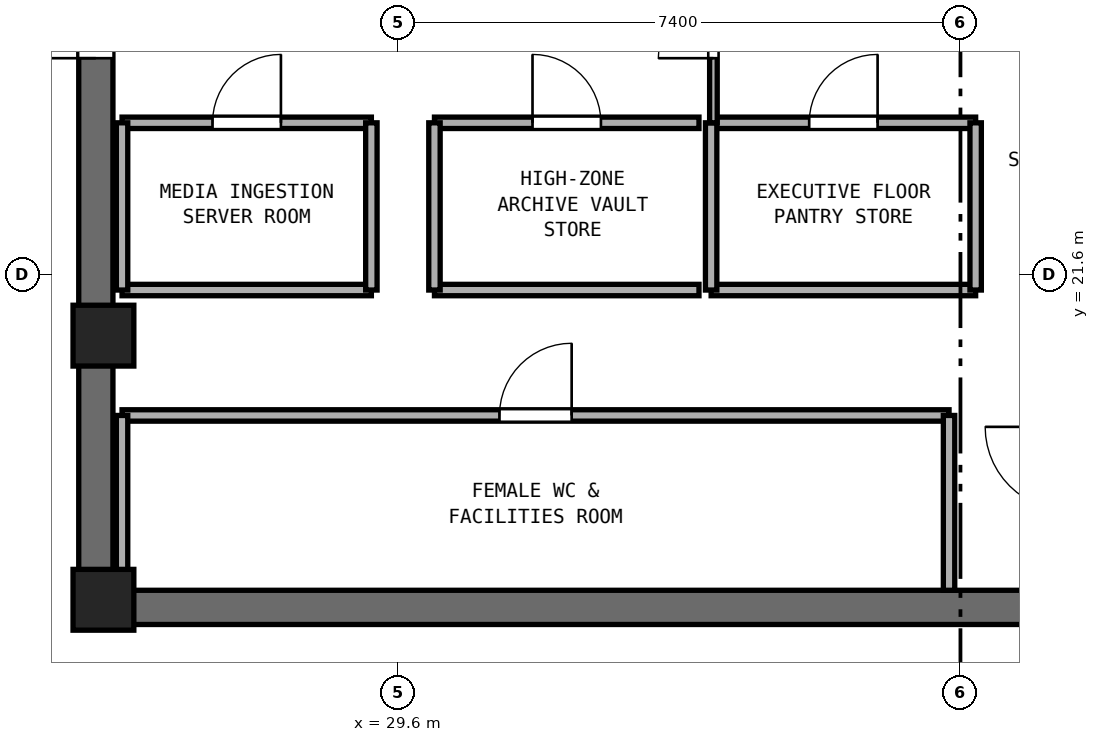
"""IFC4 building model, lengths in metres.
Left out: names, types, materials, properties, quantities, classifications, styles, units other than length and angle.
Written with IfcOpenShell. Run it as: python <this file> out.ifc"""

import sys

from ifc_helpers import new_model, si_unit, direction, frame, frame_2d, origin, origin_2d, place, context, subcontext, project, spatial, rectangle, extrude, element, fill, save


model = new_model("IFC4")
c1 = context("Model", 3, precision=1e-05, world=origin(), true_north=direction((0.0, 1.0)))
c2 = subcontext(c1, "Body", "Model", "MODEL_VIEW")
j1 = project(units=[si_unit("LENGTHUNIT", "METRE"), si_unit("PLANEANGLEUNIT", "RADIAN")], contexts=[c1])
p1 = place(None, origin())
s1 = spatial("IfcSite", under=j1, at=p1, CompositionType="ELEMENT")
p2 = place(p1, origin())
s2 = spatial("IfcBuilding", under=s1, at=p2, CompositionType="ELEMENT")
p3 = place(p2, frame((0.0, 0.0, 232.6)))
s3 = spatial("IfcBuildingStorey", under=s2, at=p3, CompositionType="ELEMENT", Elevation=232.6)
p4 = place(p3, frame((25.4, 17.225, 0.0), z_axis=(0.0, 0.0, 1.0), x_axis=(1.0, 0.0, 0.0)))
e1 = element("IfcWall", 1, at=p4, inside=s3, PredefinedType="SHEAR", context=c2, shape_type="SweptSolid", body=[
    extrude(rectangle(XDim=23.2, YDim=0.45, at=frame_2d((11.6, 0.0))), origin(), (0.0, 0.0, 1.0), 3.51),
])
p5 = place(p3, frame((25.625, 17.45, 0.0), z_axis=(0.0, 0.0, 1.0), x_axis=(0.0, 1.0, 0.0)))
e2 = element("IfcWall", 2, at=p5, inside=s3, PredefinedType="SHEAR", context=c2, shape_type="SweptSolid", body=[
    extrude(rectangle(XDim=15.5, YDim=0.45, at=frame_2d((7.75, 0.0))), origin(), (0.0, 0.0, 1.0), 3.51),
])
p6 = place(p5, frame((7.0, 0.0, 0.0)))
e3 = element("IfcOpeningElement", 3, at=p6, cuts=e2, PredefinedType="OPENING", context=c2, shape_type="SweptSolid", body=[
    extrude(rectangle(XDim=1.5, YDim=2.15, at=frame_2d((0.75, 1.075))), frame((0.0, 0.235, 0.0), z_axis=(0.0, -1.0, 0.0), x_axis=(1.0, 0.0, 0.0)), (0.0, 0.0, 1.0), 0.47),
])
for number, where, z_axis, x_axis in (
    (4, (25.725, 17.325, 0.0), (0.0, 0.0, 1.0), (1.0, 0.0, 0.0)),
    (5, (25.725, 20.8, 0.0), (0.0, 0.0, 1.0), (1.0, 0.0, 0.0)),
):
    element("IfcColumn", number, at=place(p3, frame(where, z_axis=z_axis, x_axis=x_axis)), inside=s3, PredefinedType="PILASTER", context=c2, shape_type="SweptSolid", body=[
        extrude(rectangle(XDim=0.8, YDim=0.8, at=origin_2d()), origin(), (0.0, 0.0, 1.0), 3.8),
    ])
p7 = place(p3, frame((25.97, 19.75, 0.0), z_axis=(0.0, 0.0, 1.0), x_axis=(1.0, 0.0, 0.0)))
e6 = element("IfcWall", 6, at=p7, inside=s3, PredefinedType="PARTITIONING", context=c2, shape_type="SweptSolid", body=[
    extrude(rectangle(XDim=10.88, YDim=0.15, at=frame_2d((5.44, 0.0))), origin(), (0.0, 0.0, 1.0), 3.51),
])
p8 = place(p7, frame((4.965, 0.0, 0.0)))
e7 = element("IfcOpeningElement", 7, at=p8, cuts=e6, PredefinedType="OPENING", context=c2, shape_type="SweptSolid", body=[
    extrude(rectangle(XDim=0.95, YDim=2.1, at=frame_2d((0.475, 1.05))), frame((0.0, 0.085, 0.0), z_axis=(0.0, -1.0, 0.0), x_axis=(1.0, 0.0, 0.0)), (0.0, 0.0, 1.0), 0.17),
])
p9 = place(p3, frame((25.97, 17.45, 0.0), z_axis=(0.0, 0.0, 1.0), x_axis=(0.0, 1.0, 0.0)))
e8 = element("IfcWall", 8, at=p9, inside=s3, PredefinedType="PARTITIONING", context=c2, shape_type="SweptSolid", body=[
    extrude(rectangle(XDim=2.3, YDim=0.15, at=frame_2d((1.15, 0.0))), origin(), (0.0, 0.0, 1.0), 2.61),
])
p10 = place(p3, frame((36.85, 17.45, 0.0), z_axis=(0.0, 0.0, 1.0), x_axis=(0.0, 1.0, 0.0)))
e9 = element("IfcWall", 9, at=p10, inside=s3, PredefinedType="PARTITIONING", context=c2, shape_type="SweptSolid", body=[
    extrude(rectangle(XDim=2.3, YDim=0.15, at=frame_2d((1.15, 0.0))), origin(), (0.0, 0.0, 1.0), 3.51),
])
p11 = place(p3, frame((25.97, 21.4, 0.0), z_axis=(0.0, 0.0, 1.0), x_axis=(1.0, 0.0, 0.0)))
e10 = element("IfcWall", 10, at=p11, inside=s3, PredefinedType="PARTITIONING", context=c2, shape_type="SweptSolid", body=[
    extrude(rectangle(XDim=3.28, YDim=0.15, at=frame_2d((1.64, 0.0))), origin(), (0.0, 0.0, 1.0), 3.51),
])
p12 = place(p3, frame((25.97, 23.6, 0.0), z_axis=(0.0, 0.0, 1.0), x_axis=(1.0, 0.0, 0.0)))
e11 = element("IfcWall", 11, at=p12, inside=s3, PredefinedType="PARTITIONING", context=c2, shape_type="SweptSolid", body=[
    extrude(rectangle(XDim=3.28, YDim=0.15, at=frame_2d((1.64, 0.0))), origin(), (0.0, 0.0, 1.0), 3.51),
])
p13 = place(p12, frame((1.19, 0.0, 0.0)))
e12 = element("IfcOpeningElement", 12, at=p13, cuts=e11, PredefinedType="OPENING", context=c2, shape_type="SweptSolid", body=[
    extrude(rectangle(XDim=0.9, YDim=2.1, at=frame_2d((0.45, 1.05))), frame((0.0, 0.085, 0.0), z_axis=(0.0, -1.0, 0.0), x_axis=(1.0, 0.0, 0.0)), (0.0, 0.0, 1.0), 0.17),
])
p14 = place(p3, frame((25.97, 21.4, 0.0), z_axis=(0.0, 0.0, 1.0), x_axis=(0.0, 1.0, 0.0)))
e13 = element("IfcWall", 13, at=p14, inside=s3, PredefinedType="PARTITIONING", context=c2, shape_type="SweptSolid", body=[
    extrude(rectangle(XDim=2.2, YDim=0.15, at=frame_2d((1.1, 0.0))), origin(), (0.0, 0.0, 1.0), 2.61),
])
p15 = place(p3, frame((29.25, 21.4, 0.0), z_axis=(0.0, 0.0, 1.0), x_axis=(0.0, 1.0, 0.0)))
e14 = element("IfcWall", 14, at=p15, inside=s3, PredefinedType="PARTITIONING", context=c2, shape_type="SweptSolid", body=[
    extrude(rectangle(XDim=2.2, YDim=0.15, at=frame_2d((1.1, 0.0))), origin(), (0.0, 0.0, 1.0), 3.51),
])
p16 = place(p3, frame((30.08, 21.4, 0.0), z_axis=(0.0, 0.0, 1.0), x_axis=(1.0, 0.0, 0.0)))
e15 = element("IfcWall", 15, at=p16, inside=s3, PredefinedType="PARTITIONING", context=c2, shape_type="SweptSolid", body=[
    extrude(rectangle(XDim=3.48, YDim=0.15, at=frame_2d((1.74, 0.0))), origin(), (0.0, 0.0, 1.0), 3.51),
])
p17 = place(p3, frame((30.08, 23.6, 0.0), z_axis=(0.0, 0.0, 1.0), x_axis=(1.0, 0.0, 0.0)))
e16 = element("IfcWall", 16, at=p17, inside=s3, PredefinedType="PARTITIONING", context=c2, shape_type="SweptSolid", body=[
    extrude(rectangle(XDim=3.48, YDim=0.15, at=frame_2d((1.74, 0.0))), origin(), (0.0, 0.0, 1.0), 3.51),
])
p18 = place(p17, frame((1.29, 0.0, 0.0)))
e17 = element("IfcOpeningElement", 17, at=p18, cuts=e16, PredefinedType="OPENING", context=c2, shape_type="SweptSolid", body=[
    extrude(rectangle(XDim=0.9, YDim=2.1, at=frame_2d((0.45, 1.05))), frame((0.0, 0.085, 0.0), z_axis=(0.0, -1.0, 0.0), x_axis=(1.0, 0.0, 0.0)), (0.0, 0.0, 1.0), 0.17),
])
p19 = place(p3, frame((30.08, 21.4, 0.0), z_axis=(0.0, 0.0, 1.0), x_axis=(0.0, 1.0, 0.0)))
e18 = element("IfcWall", 18, at=p19, inside=s3, PredefinedType="PARTITIONING", context=c2, shape_type="SweptSolid", body=[
    extrude(rectangle(XDim=2.2, YDim=0.15, at=frame_2d((1.1, 0.0))), origin(), (0.0, 0.0, 1.0), 3.51),
])
p20 = place(p3, frame((33.72, 21.4, 0.0), z_axis=(0.0, 0.0, 1.0), x_axis=(1.0, 0.0, 0.0)))
e19 = element("IfcWall", 19, at=p20, inside=s3, PredefinedType="PARTITIONING", context=c2, shape_type="SweptSolid", body=[
    extrude(rectangle(XDim=3.48, YDim=0.15, at=frame_2d((1.74, 0.0))), origin(), (0.0, 0.0, 1.0), 3.51),
])
p21 = place(p3, frame((33.72, 23.6, 0.0), z_axis=(0.0, 0.0, 1.0), x_axis=(1.0, 0.0, 0.0)))
e20 = element("IfcWall", 20, at=p21, inside=s3, PredefinedType="PARTITIONING", context=c2, shape_type="SweptSolid", body=[
    extrude(rectangle(XDim=3.48, YDim=0.15, at=frame_2d((1.74, 0.0))), origin(), (0.0, 0.0, 1.0), 3.51),
])
p22 = place(p21, frame((1.29, 0.0, 0.0)))
e21 = element("IfcOpeningElement", 21, at=p22, cuts=e20, PredefinedType="OPENING", context=c2, shape_type="SweptSolid", body=[
    extrude(rectangle(XDim=0.9, YDim=2.1, at=frame_2d((0.45, 1.05))), frame((0.0, 0.085, 0.0), z_axis=(0.0, -1.0, 0.0), x_axis=(1.0, 0.0, 0.0)), (0.0, 0.0, 1.0), 0.17),
])
for number, where, z_axis, x_axis in (
    (22, (33.72, 21.4, 0.0), (0.0, 0.0, 1.0), (0.0, 1.0, 0.0)),
    (23, (37.2, 21.4, 0.0), (0.0, 0.0, 1.0), (0.0, 1.0, 0.0)),
):
    element("IfcWall", number, at=place(p3, frame(where, z_axis=z_axis, x_axis=x_axis)), inside=s3, PredefinedType="PARTITIONING", context=c2, shape_type="SweptSolid", body=[
        extrude(rectangle(XDim=2.2, YDim=0.15, at=frame_2d((1.1, 0.0))), origin(), (0.0, 0.0, 1.0), 3.51),
    ])
p23 = place(p3, frame((33.75, 23.6, 0.0), z_axis=(0.0, 0.0, 1.0), x_axis=(0.0, 1.0, 0.0)))
e24 = element("IfcWall", 24, at=p23, inside=s3, PredefinedType="PARTITIONING", context=c2, shape_type="SweptSolid", body=[
    extrude(rectangle(XDim=3.2, YDim=0.1, at=frame_2d((1.6, 0.0))), origin(), (0.0, 0.0, 1.0), 3.51),
])
p24 = place(p23, frame((0.85, 0.0, 0.0)))
e25 = element("IfcOpeningElement", 25, at=p24, cuts=e24, PredefinedType="OPENING", context=c2, shape_type="SweptSolid", body=[
    extrude(rectangle(XDim=1.45, YDim=2.12, at=frame_2d((0.725, 1.06))), frame((0.0, 0.06, 0.0), z_axis=(0.0, -1.0, 0.0), x_axis=(1.0, 0.0, 0.0)), (0.0, 0.0, 1.0), 0.12),
])
p25 = place(p6, origin())
e26 = element("IfcDoor", 26, at=p25, inside=s3, OperationType="DOUBLE_DOOR_SINGLE_SWING", PredefinedType="DOOR", context=c2, shape_type="SweptSolid", body=[
    extrude(rectangle(XDim=1.5, YDim=2.15, at=frame_2d((0.75, 1.075))), frame((0.0, 0.025, 0.0), z_axis=(0.0, -1.0, 0.0), x_axis=(1.0, 0.0, 0.0)), (0.0, 0.0, 1.0), 0.05),
])
fill(e3, e26)
p26 = place(p8, origin())
e27 = element("IfcDoor", 27, at=p26, inside=s3, OperationType="SINGLE_SWING_RIGHT", PredefinedType="DOOR", context=c2, shape_type="SweptSolid", body=[
    extrude(rectangle(XDim=0.95, YDim=2.1, at=frame_2d((0.475, 1.05))), frame((0.0, 0.025, 0.0), z_axis=(0.0, -1.0, 0.0), x_axis=(1.0, 0.0, 0.0)), (0.0, 0.0, 1.0), 0.05),
])
fill(e7, e27)
p27 = place(p13, origin())
e28 = element("IfcDoor", 28, at=p27, inside=s3, OperationType="SINGLE_SWING_RIGHT", PredefinedType="DOOR", context=c2, shape_type="SweptSolid", body=[
    extrude(rectangle(XDim=0.9, YDim=2.1, at=frame_2d((0.45, 1.05))), frame((0.0, 0.025, 0.0), z_axis=(0.0, -1.0, 0.0), x_axis=(1.0, 0.0, 0.0)), (0.0, 0.0, 1.0), 0.05),
])
fill(e12, e28)
p28 = place(p18, origin())
e29 = element("IfcDoor", 29, at=p28, inside=s3, OperationType="SINGLE_SWING_LEFT", PredefinedType="DOOR", context=c2, shape_type="SweptSolid", body=[
    extrude(rectangle(XDim=0.9, YDim=2.1, at=frame_2d((0.45, 1.05))), frame((0.0, 0.025, 0.0), z_axis=(0.0, -1.0, 0.0), x_axis=(1.0, 0.0, 0.0)), (0.0, 0.0, 1.0), 0.05),
])
fill(e17, e29)
p29 = place(p22, origin())
e30 = element("IfcDoor", 30, at=p29, inside=s3, OperationType="SINGLE_SWING_RIGHT", PredefinedType="DOOR", context=c2, shape_type="SweptSolid", body=[
    extrude(rectangle(XDim=0.9, YDim=2.1, at=frame_2d((0.45, 1.05))), frame((0.0, 0.025, 0.0), z_axis=(0.0, -1.0, 0.0), x_axis=(1.0, 0.0, 0.0)), (0.0, 0.0, 1.0), 0.05),
])
fill(e21, e30)
p30 = place(p24, origin())
e31 = element("IfcDoor", 31, at=p30, inside=s3, OperationType="DOUBLE_DOOR_SINGLE_SWING", PredefinedType="DOOR", context=c2, shape_type="SweptSolid", body=[
    extrude(rectangle(XDim=1.45, YDim=2.12, at=frame_2d((0.725, 1.06))), frame((0.0, 0.025, 0.0), z_axis=(0.0, -1.0, 0.0), x_axis=(1.0, 0.0, 0.0)), (0.0, 0.0, 1.0), 0.05),
])
fill(e25, e31)
save(model, sys.argv[1])
